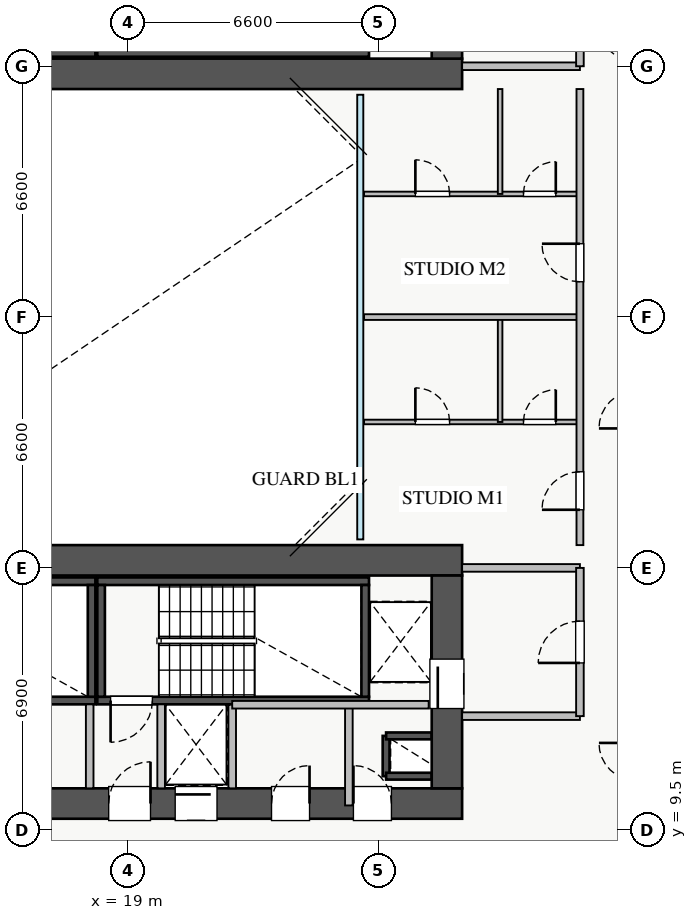
"""IFC4 building model, lengths in metres.
Left out: names, types, materials, properties, quantities, classifications, styles, units other than length and angle.
Written with IfcOpenShell. Run it as: python <this file> out.ifc"""

import sys

from ifc_helpers import new_model, si_unit, direction, frame, frame_2d, origin, place, context, subcontext, project, spatial, rectangle, extrude, source, transform, mapped, element, fill, save


model = new_model("IFC4")
c1 = context("Model", 3, precision=1e-05, world=origin(), true_north=direction((0.0, 1.0)))
c2 = subcontext(c1, "Body", "Model", "MODEL_VIEW")
j1 = project(units=[si_unit("LENGTHUNIT", "METRE"), si_unit("PLANEANGLEUNIT", "RADIAN")], contexts=[c1])
p1 = place(None, origin())
s1 = spatial("IfcSite", under=j1, at=p1, CompositionType="ELEMENT")
p2 = place(p1, origin())
s2 = spatial("IfcBuilding", under=s1, at=p2, CompositionType="ELEMENT")
p3 = place(p2, frame((0.0, 0.0, 50.25)))
s3 = spatial("IfcBuildingStorey", under=s2, at=p3, CompositionType="ELEMENT", Elevation=50.25)
p4 = place(p3, frame((25.8, 10.92, 0.0), z_axis=(0.0, 0.0, 1.0), x_axis=(0.0, 1.0, 0.0)))
e1 = element("IfcWall", 1, at=p4, inside=s3, PredefinedType="SHEAR", context=c2, shape_type="SweptSolid", body=[
    extrude(rectangle(XDim=1.06, YDim=0.18, at=frame_2d((0.53, 0.0))), origin(), (0.0, 0.0, 1.0), 3.07),
])
for number, where, z_axis, x_axis in (
    (2, (25.8, 11.98, 0.0), (0.0, 0.0, 1.0), (1.0, 0.0, 0.0)),
    (3, (25.8, 10.92, 0.0), (0.0, 0.0, 1.0), (1.0, 0.0, 0.0)),
):
    element("IfcWall", number, at=place(p3, frame(where, z_axis=z_axis, x_axis=x_axis)), inside=s3, PredefinedType="SHEAR", context=c2, shape_type="SweptSolid", body=[
        extrude(rectangle(XDim=1.2, YDim=0.18, at=frame_2d((0.6, 0.0))), origin(), (0.0, 0.0, 1.0), 3.07),
    ])
p5 = place(p3, frame((19.88, 12.8, 0.0), z_axis=(0.0, 0.0, 1.0), x_axis=(1.0, 0.0, 0.0)))
e4 = element("IfcWall", 4, at=p5, inside=s3, PredefinedType="SHEAR", context=c2, shape_type="SweptSolid", body=[
    extrude(rectangle(XDim=1.87, YDim=0.18, at=frame_2d((0.935, 0.0))), origin(), (0.0, 0.0, 1.0), 3.07),
])
p6 = place(p3, frame((11.0, 29.95, 0.0), z_axis=(0.0, 0.0, 1.0), x_axis=(1.0, 0.0, 0.0)))
e5 = element("IfcWall", 5, at=p6, inside=s3, PredefinedType="SHEAR", context=c2, shape_type="SweptSolid", body=[
    extrude(rectangle(XDim=7.15, YDim=0.2, at=frame_2d((3.575, 0.0))), origin(), (0.0, 0.0, 1.0), 3.25),
])
p7 = place(p3, frame((18.2, 29.95, 0.0), z_axis=(0.0, 0.0, 1.0), x_axis=(1.0, 0.0, 0.0)))
e6 = element("IfcWall", 6, at=p7, inside=s3, PredefinedType="SHEAR", context=c2, shape_type="SweptSolid", body=[
    extrude(rectangle(XDim=7.15, YDim=0.2, at=frame_2d((3.575, 0.0))), origin(), (0.0, 0.0, 1.0), 3.25),
])
p8 = place(p3, frame((11.0, 12.91, 0.0), z_axis=(0.0, 0.0, 1.0), x_axis=(1.0, 0.0, 0.0)))
e7 = element("IfcWall", 7, at=p8, inside=s3, PredefinedType="SHEAR", context=c2, shape_type="SweptSolid", body=[
    extrude(rectangle(XDim=7.15, YDim=0.2, at=frame_2d((3.575, 0.0))), origin(), (0.0, 0.0, 1.0), 3.25),
])
p9 = place(p8, frame((0.35, 0.0, 0.0)))
e8 = element("IfcOpeningElement", 8, at=p9, cuts=e7, PredefinedType="OPENING", context=c2, shape_type="SweptSolid", body=[
    extrude(rectangle(XDim=1.1, YDim=2.05, at=frame_2d((0.55, 1.025))), frame((0.0, 0.11, 0.0), z_axis=(0.0, -1.0, 0.0), x_axis=(1.0, 0.0, 0.0)), (0.0, 0.0, 1.0), 0.22),
])
p10 = place(p3, frame((11.0, 16.05, 0.0), z_axis=(0.0, 0.0, 1.0), x_axis=(1.0, 0.0, 0.0)))
e9 = element("IfcWall", 9, at=p10, inside=s3, PredefinedType="SHEAR", context=c2, shape_type="SweptSolid", body=[
    extrude(rectangle(XDim=7.15, YDim=0.2, at=frame_2d((3.575, 0.0))), origin(), (0.0, 0.0, 1.0), 3.25),
])
p11 = place(p3, frame((18.05, 13.01, 0.0), z_axis=(0.0, 0.0, 1.0), x_axis=(0.0, 1.0, 0.0)))
e10 = element("IfcWall", 10, at=p11, inside=s3, PredefinedType="SHEAR", context=c2, shape_type="SweptSolid", body=[
    extrude(rectangle(XDim=2.94, YDim=0.2, at=frame_2d((1.47, 0.0))), origin(), (0.0, 0.0, 1.0), 3.25),
])
p12 = place(p3, frame((18.2, 12.91, 0.0), z_axis=(0.0, 0.0, 1.0), x_axis=(1.0, 0.0, 0.0)))
e11 = element("IfcWall", 11, at=p12, inside=s3, PredefinedType="SHEAR", context=c2, shape_type="SweptSolid", body=[
    extrude(rectangle(XDim=7.15, YDim=0.2, at=frame_2d((3.575, 0.0))), origin(), (0.0, 0.0, 1.0), 3.25),
])
p13 = place(p12, frame((0.35, 0.0, 0.0)))
e12 = element("IfcOpeningElement", 12, at=p13, cuts=e11, PredefinedType="OPENING", context=c2, shape_type="SweptSolid", body=[
    extrude(rectangle(XDim=1.1, YDim=2.05, at=frame_2d((0.55, 1.025))), frame((0.0, 0.11, 0.0), z_axis=(0.0, -1.0, 0.0), x_axis=(1.0, 0.0, 0.0)), (0.0, 0.0, 1.0), 0.22),
])
p14 = place(p3, frame((18.2, 16.05, 0.0), z_axis=(0.0, 0.0, 1.0), x_axis=(1.0, 0.0, 0.0)))
e13 = element("IfcWall", 13, at=p14, inside=s3, PredefinedType="SHEAR", context=c2, shape_type="SweptSolid", body=[
    extrude(rectangle(XDim=7.15, YDim=0.2, at=frame_2d((3.575, 0.0))), origin(), (0.0, 0.0, 1.0), 3.25),
])
for number, where, z_axis, x_axis in (
    (14, (18.3, 13.01, 0.0), (0.0, 0.0, 1.0), (0.0, 1.0, 0.0)),
    (15, (25.25, 13.01, 0.0), (0.0, 0.0, 1.0), (0.0, 1.0, 0.0)),
):
    element("IfcWall", number, at=place(p3, frame(where, z_axis=z_axis, x_axis=x_axis)), inside=s3, PredefinedType="SHEAR", context=c2, shape_type="SweptSolid", body=[
        extrude(rectangle(XDim=2.94, YDim=0.2, at=frame_2d((1.47, 0.0))), origin(), (0.0, 0.0, 1.0), 3.25),
    ])
p15 = place(p3, frame((10.2, 29.4, 0.0), z_axis=(0.0, 0.0, 1.0), x_axis=(1.0, 0.0, 0.0)))
e16 = element("IfcWall", 16, at=p15, inside=s3, PredefinedType="SHEAR", context=c2, shape_type="SweptSolid", body=[
    extrude(rectangle(XDim=17.6, YDim=0.8, at=frame_2d((8.8, 0.0))), origin(), (0.0, 0.0, 1.0), 3.25),
])
p16 = place(p3, frame((27.4, 29.8, 0.0), z_axis=(0.0, 0.0, 1.0), x_axis=(0.0, 1.0, 0.0)))
e17 = element("IfcWall", 17, at=p16, inside=s3, PredefinedType="SHEAR", context=c2, shape_type="SweptSolid", body=[
    extrude(rectangle(XDim=5.6, YDim=0.8, at=frame_2d((2.8, 0.0))), origin(), (0.0, 0.0, 1.0), 3.25),
])
p17 = place(p16, frame((1.1, 0.0, 0.0)))
e18 = element("IfcOpeningElement", 18, at=p17, cuts=e17, PredefinedType="OPENING", context=c2, shape_type="SweptSolid", body=[
    extrude(rectangle(XDim=1.3, YDim=2.05, at=frame_2d((0.65, 1.025))), frame((0.0, 0.41, 0.0), z_axis=(0.0, -1.0, 0.0), x_axis=(1.0, 0.0, 0.0)), (0.0, 0.0, 1.0), 0.82),
])
p18 = place(p3, frame((10.2, 10.2, 0.0), z_axis=(0.0, 0.0, 1.0), x_axis=(1.0, 0.0, 0.0)))
e19 = element("IfcWall", 19, at=p18, inside=s3, PredefinedType="SHEAR", context=c2, shape_type="SweptSolid", body=[
    extrude(rectangle(XDim=17.6, YDim=0.8, at=frame_2d((8.8, 0.0))), origin(), (0.0, 0.0, 1.0), 3.25),
])
p19 = place(p18, frame((1.15, 0.0, 0.0)))
e20 = element("IfcOpeningElement", 20, at=p19, cuts=e19, PredefinedType="OPENING", context=c2, shape_type="SweptSolid", body=[
    extrude(rectangle(XDim=1.1, YDim=2.05, at=frame_2d((0.55, 1.025))), frame((0.0, 0.41, 0.0), z_axis=(0.0, -1.0, 0.0), x_axis=(1.0, 0.0, 0.0)), (0.0, 0.0, 1.0), 0.82),
])
p20 = place(p18, frame((8.3, 0.0, 0.0)))
e21 = element("IfcOpeningElement", 21, at=p20, cuts=e19, PredefinedType="OPENING", context=c2, shape_type="SweptSolid", body=[
    extrude(rectangle(XDim=1.1, YDim=2.05, at=frame_2d((0.55, 1.025))), frame((0.0, 0.41, 0.0), z_axis=(0.0, -1.0, 0.0), x_axis=(1.0, 0.0, 0.0)), (0.0, 0.0, 1.0), 0.82),
])
p21 = place(p18, frame((10.05, 0.0, 0.0)))
e22 = element("IfcOpeningElement", 22, at=p21, cuts=e19, PredefinedType="OPENING", context=c2, shape_type="SweptSolid", body=[
    extrude(rectangle(XDim=1.1, YDim=2.05, at=frame_2d((0.55, 1.025))), frame((0.0, 0.41, 0.0), z_axis=(0.0, -1.0, 0.0), x_axis=(1.0, 0.0, 0.0)), (0.0, 0.0, 1.0), 0.82),
])
p22 = place(p18, frame((14.74, 0.0, 0.0)))
e23 = element("IfcOpeningElement", 23, at=p22, cuts=e19, PredefinedType="OPENING", context=c2, shape_type="SweptSolid", body=[
    extrude(rectangle(XDim=1.0, YDim=2.05, at=frame_2d((0.5, 1.025))), frame((0.0, 0.41, 0.0), z_axis=(0.0, -1.0, 0.0), x_axis=(1.0, 0.0, 0.0)), (0.0, 0.0, 1.0), 0.82),
])
p23 = place(p18, frame((12.585, 0.0, 0.0)))
e24 = element("IfcOpeningElement", 24, at=p23, cuts=e19, PredefinedType="OPENING", context=c2, shape_type="SweptSolid", body=[
    extrude(rectangle(XDim=1.0, YDim=2.05, at=frame_2d((0.5, 1.025))), frame((0.0, 0.41, 0.0), z_axis=(0.0, -1.0, 0.0), x_axis=(1.0, 0.0, 0.0)), (0.0, 0.0, 1.0), 0.82),
])
p24 = place(p3, frame((10.2, 16.6, 0.0), z_axis=(0.0, 0.0, 1.0), x_axis=(1.0, 0.0, 0.0)))
e25 = element("IfcWall", 25, at=p24, inside=s3, PredefinedType="SHEAR", context=c2, shape_type="SweptSolid", body=[
    extrude(rectangle(XDim=17.6, YDim=0.8, at=frame_2d((8.8, 0.0))), origin(), (0.0, 0.0, 1.0), 3.25),
])
p25 = place(p3, frame((27.4, 10.6, 0.0), z_axis=(0.0, 0.0, 1.0), x_axis=(0.0, 1.0, 0.0)))
e26 = element("IfcWall", 26, at=p25, inside=s3, PredefinedType="SHEAR", context=c2, shape_type="SweptSolid", body=[
    extrude(rectangle(XDim=5.6, YDim=0.8, at=frame_2d((2.8, 0.0))), origin(), (0.0, 0.0, 1.0), 3.25),
])
p26 = place(p25, frame((2.1, 0.0, 0.0)))
e27 = element("IfcOpeningElement", 27, at=p26, cuts=e26, PredefinedType="OPENING", context=c2, shape_type="SweptSolid", body=[
    extrude(rectangle(XDim=1.3, YDim=2.05, at=frame_2d((0.65, 1.025))), frame((0.0, 0.41, 0.0), z_axis=(0.0, -1.0, 0.0), x_axis=(1.0, 0.0, 0.0)), (0.0, 0.0, 1.0), 0.82),
])
p27 = place(p3, frame((27.8, 29.6, 0.0), z_axis=(0.0, 0.0, 1.0), x_axis=(1.0, 0.0, 0.0)))
e28 = element("IfcWall", 28, at=p27, inside=s3, PredefinedType="PARTITIONING", context=c2, shape_type="SweptSolid", body=[
    extrude(rectangle(XDim=3.1, YDim=0.2, at=frame_2d((1.55, 0.0))), origin(), (0.0, 0.0, 1.0), 3.07),
])
p28 = place(p3, frame((30.9, 29.6, 0.0), z_axis=(0.0, 0.0, 1.0), x_axis=(0.0, 1.0, 0.0)))
e29 = element("IfcWall", 29, at=p28, inside=s3, PredefinedType="PARTITIONING", context=c2, shape_type="SweptSolid", body=[
    extrude(rectangle(XDim=3.9, YDim=0.2, at=frame_2d((1.95, 0.0))), origin(), (0.0, 0.0, 1.0), 3.07),
])
p29 = place(p28, frame((1.4, 0.0, 0.0)))
e30 = element("IfcOpeningElement", 30, at=p29, cuts=e29, PredefinedType="OPENING", context=c2, shape_type="SweptSolid", body=[
    extrude(rectangle(XDim=1.1, YDim=2.05, at=frame_2d((0.55, 1.025))), frame((0.0, 0.11, 0.0), z_axis=(0.0, -1.0, 0.0), x_axis=(1.0, 0.0, 0.0)), (0.0, 0.0, 1.0), 0.22),
])
for number, where, z_axis, x_axis in (
    (31, (27.8, 16.4, 0.0), (0.0, 0.0, 1.0), (1.0, 0.0, 0.0)),
    (32, (27.8, 12.5, 0.0), (0.0, 0.0, 1.0), (1.0, 0.0, 0.0)),
):
    element("IfcWall", number, at=place(p3, frame(where, z_axis=z_axis, x_axis=x_axis)), inside=s3, PredefinedType="PARTITIONING", context=c2, shape_type="SweptSolid", body=[
        extrude(rectangle(XDim=3.1, YDim=0.2, at=frame_2d((1.55, 0.0))), origin(), (0.0, 0.0, 1.0), 3.07),
    ])
p30 = place(p3, frame((30.9, 12.5, 0.0), z_axis=(0.0, 0.0, 1.0), x_axis=(0.0, 1.0, 0.0)))
e33 = element("IfcWall", 33, at=p30, inside=s3, PredefinedType="PARTITIONING", context=c2, shape_type="SweptSolid", body=[
    extrude(rectangle(XDim=3.9, YDim=0.2, at=frame_2d((1.95, 0.0))), origin(), (0.0, 0.0, 1.0), 3.07),
])
p31 = place(p30, frame((1.4, 0.0, 0.0)))
e34 = element("IfcOpeningElement", 34, at=p31, cuts=e33, PredefinedType="OPENING", context=c2, shape_type="SweptSolid", body=[
    extrude(rectangle(XDim=1.1, YDim=2.05, at=frame_2d((0.55, 1.025))), frame((0.0, 0.11, 0.0), z_axis=(0.0, -1.0, 0.0), x_axis=(1.0, 0.0, 0.0)), (0.0, 0.0, 1.0), 0.22),
])
for number, where, z_axis, x_axis in (
    (35, (18.0, 10.6, 0.0), (0.0, 0.0, 1.0), (0.0, 1.0, 0.0)),
    (36, (19.88, 10.6, 0.0), (0.0, 0.0, 1.0), (0.0, 1.0, 0.0)),
):
    element("IfcWall", number, at=place(p3, frame(where, z_axis=z_axis, x_axis=x_axis)), inside=s3, PredefinedType="PARTITIONING", context=c2, shape_type="SweptSolid", body=[
        extrude(rectangle(XDim=2.21, YDim=0.2, at=frame_2d((1.105, 0.0))), origin(), (0.0, 0.0, 1.0), 3.07),
    ])
p32 = place(p3, frame((24.82, 10.15, 0.0), z_axis=(0.0, 0.0, 1.0), x_axis=(0.0, 1.0, 0.0)))
e37 = element("IfcWall", 37, at=p32, inside=s3, PredefinedType="PARTITIONING", context=c2, shape_type="SweptSolid", body=[
    extrude(rectangle(XDim=2.65, YDim=0.2, at=frame_2d((1.325, 0.0))), origin(), (0.0, 0.0, 1.0), 3.07),
])
p33 = place(p3, frame((21.75, 10.6, 0.0), z_axis=(0.0, 0.0, 1.0), x_axis=(0.0, 1.0, 0.0)))
e38 = element("IfcWall", 38, at=p33, inside=s3, PredefinedType="PARTITIONING", context=c2, shape_type="SweptSolid", body=[
    extrude(rectangle(XDim=2.2, YDim=0.2, at=frame_2d((1.1, 0.0))), origin(), (0.0, 0.0, 1.0), 3.07),
])
p34 = place(p3, frame((21.75, 12.8, 0.0), z_axis=(0.0, 0.0, 1.0), x_axis=(1.0, 0.0, 0.0)))
e39 = element("IfcWall", 39, at=p34, inside=s3, PredefinedType="PARTITIONING", context=c2, shape_type="SweptSolid", body=[
    extrude(rectangle(XDim=5.17, YDim=0.2, at=frame_2d((2.585, 0.0))), origin(), (0.0, 0.0, 1.0), 3.07),
])
p35 = place(p3, frame((25.22, 20.24, 0.0), z_axis=(0.0, 0.0, 1.0), x_axis=(1.0, 0.0, 0.0)))
e40 = element("IfcWall", 40, at=p35, inside=s3, PredefinedType="PLUMBINGWALL", context=c2, shape_type="SweptSolid", body=[
    extrude(rectangle(XDim=5.68, YDim=0.12, at=frame_2d((2.84, 0.0))), origin(), (0.0, 0.0, 1.0), 2.625),
])
p36 = place(p35, frame((1.35, 0.0, 0.0)))
e41 = element("IfcOpeningElement", 41, at=p36, cuts=e40, PredefinedType="OPENING", context=c2, shape_type="SweptSolid", body=[
    extrude(rectangle(XDim=0.9, YDim=2.05, at=frame_2d((0.45, 1.025))), frame((0.0, 0.07, 0.0), z_axis=(0.0, -1.0, 0.0), x_axis=(1.0, 0.0, 0.0)), (0.0, 0.0, 1.0), 0.14),
])
p37 = place(p35, frame((4.195, 0.0, 0.0)))
e42 = element("IfcOpeningElement", 42, at=p37, cuts=e40, PredefinedType="OPENING", context=c2, shape_type="SweptSolid", body=[
    extrude(rectangle(XDim=0.85, YDim=2.05, at=frame_2d((0.425, 1.025))), frame((0.0, 0.07, 0.0), z_axis=(0.0, -1.0, 0.0), x_axis=(1.0, 0.0, 0.0)), (0.0, 0.0, 1.0), 0.14),
])
p38 = place(p3, frame((28.8, 20.24, 0.0), z_axis=(0.0, 0.0, 1.0), x_axis=(0.0, 1.0, 0.0)))
e43 = element("IfcWall", 43, at=p38, inside=s3, PredefinedType="PLUMBINGWALL", context=c2, shape_type="SweptSolid", body=[
    extrude(rectangle(XDim=2.76, YDim=0.12, at=frame_2d((1.38, 0.0))), origin(), (0.0, 0.0, 1.0), 3.07),
])
p39 = place(p3, frame((25.22, 26.24, 0.0), z_axis=(0.0, 0.0, 1.0), x_axis=(1.0, 0.0, 0.0)))
e44 = element("IfcWall", 44, at=p39, inside=s3, PredefinedType="PLUMBINGWALL", context=c2, shape_type="SweptSolid", body=[
    extrude(rectangle(XDim=5.68, YDim=0.12, at=frame_2d((2.84, 0.0))), origin(), (0.0, 0.0, 1.0), 2.625),
])
p40 = place(p39, frame((1.35, 0.0, 0.0)))
e45 = element("IfcOpeningElement", 45, at=p40, cuts=e44, PredefinedType="OPENING", context=c2, shape_type="SweptSolid", body=[
    extrude(rectangle(XDim=0.9, YDim=2.05, at=frame_2d((0.45, 1.025))), frame((0.0, 0.07, 0.0), z_axis=(0.0, -1.0, 0.0), x_axis=(1.0, 0.0, 0.0)), (0.0, 0.0, 1.0), 0.14),
])
p41 = place(p39, frame((4.195, 0.0, 0.0)))
e46 = element("IfcOpeningElement", 46, at=p41, cuts=e44, PredefinedType="OPENING", context=c2, shape_type="SweptSolid", body=[
    extrude(rectangle(XDim=0.85, YDim=2.05, at=frame_2d((0.425, 1.025))), frame((0.0, 0.07, 0.0), z_axis=(0.0, -1.0, 0.0), x_axis=(1.0, 0.0, 0.0)), (0.0, 0.0, 1.0), 0.14),
])
p42 = place(p3, frame((28.8, 26.24, 0.0), z_axis=(0.0, 0.0, 1.0), x_axis=(0.0, 1.0, 0.0)))
e47 = element("IfcWall", 47, at=p42, inside=s3, PredefinedType="PLUMBINGWALL", context=c2, shape_type="SweptSolid", body=[
    extrude(rectangle(XDim=2.76, YDim=0.12, at=frame_2d((1.38, 0.0))), origin(), (0.0, 0.0, 1.0), 3.07),
])
p43 = place(p3, frame((25.22, 23.0, 0.0), z_axis=(0.0, 0.0, 1.0), x_axis=(1.0, 0.0, 0.0)))
e48 = element("IfcWall", 48, at=p43, inside=s3, PredefinedType="PARTITIONING", context=c2, shape_type="SweptSolid", body=[
    extrude(rectangle(XDim=5.68, YDim=0.15, at=frame_2d((2.84, 0.0))), origin(), (0.0, 0.0, 1.0), 3.07),
])
p44 = place(p3, frame((30.9, 17.0, 0.0), z_axis=(0.0, 0.0, 1.0), x_axis=(0.0, 1.0, 0.0)))
e49 = element("IfcWall", 49, at=p44, inside=s3, PredefinedType="PARTITIONING", context=c2, shape_type="SweptSolid", body=[
    extrude(rectangle(XDim=12.0, YDim=0.18, at=frame_2d((6.0, 0.0))), origin(), (0.0, 0.0, 1.0), 3.07),
])
p45 = place(p44, frame((0.93, 0.0, 0.0)))
e50 = element("IfcOpeningElement", 50, at=p45, cuts=e49, PredefinedType="OPENING", context=c2, shape_type="SweptSolid", body=[
    extrude(rectangle(XDim=1.0, YDim=2.05, at=frame_2d((0.5, 1.025))), frame((0.0, 0.1, 0.0), z_axis=(0.0, -1.0, 0.0), x_axis=(1.0, 0.0, 0.0)), (0.0, 0.0, 1.0), 0.2),
])
p46 = place(p44, frame((6.93, 0.0, 0.0)))
e51 = element("IfcOpeningElement", 51, at=p46, cuts=e49, PredefinedType="OPENING", context=c2, shape_type="SweptSolid", body=[
    extrude(rectangle(XDim=1.0, YDim=2.05, at=frame_2d((0.5, 1.025))), frame((0.0, 0.1, 0.0), z_axis=(0.0, -1.0, 0.0), x_axis=(1.0, 0.0, 0.0)), (0.0, 0.0, 1.0), 0.2),
])
m1 = source(origin(), c2, "Body", "SweptSolid", [
    extrude(rectangle(XDim=1.3, YDim=2.05, at=frame_2d((0.65, 1.025))), frame((0.0, 0.025, 0.0), z_axis=(0.0, -1.0, 0.0), x_axis=(1.0, 0.0, 0.0)), (0.0, 0.0, 1.0), 0.05),
])
p47 = place(p26, origin())
e52 = element("IfcDoor", 52, at=p47, inside=s3, OperationType="SLIDING_TO_RIGHT", PredefinedType="DOOR", context=c2, shape_type="MappedRepresentation", body=[
    mapped(m1, transform((0.0, 0.0, 0.0), x_axis=(1.0, 0.0, 0.0), y_axis=(0.0, 1.0, 0.0), z_axis=(0.0, 0.0, 1.0), scale=1.0)),
])
fill(e27, e52)
m2 = source(origin(), c2, "Body", "SweptSolid", [
    extrude(rectangle(XDim=1.1, YDim=2.05, at=frame_2d((0.55, 1.025))), frame((0.0, 0.025, 0.0), z_axis=(0.0, -1.0, 0.0), x_axis=(1.0, 0.0, 0.0)), (0.0, 0.0, 1.0), 0.05),
])
p48 = place(p20, origin())
e53 = element("IfcDoor", 53, at=p48, inside=s3, OperationType="SINGLE_SWING_RIGHT", PredefinedType="DOOR", context=c2, shape_type="MappedRepresentation", body=[
    mapped(m2, transform((0.0, 0.0, 0.0), x_axis=(1.0, 0.0, 0.0), y_axis=(0.0, 1.0, 0.0), z_axis=(0.0, 0.0, 1.0), scale=1.0)),
])
fill(e21, e53)
p49 = place(p13, frame((1.1, 0.0, 0.0), z_axis=(0.0, 0.0, 1.0), x_axis=(-1.0, 0.0, 0.0)))
e54 = element("IfcDoor", 54, at=p49, inside=s3, OperationType="SINGLE_SWING_LEFT", PredefinedType="DOOR", context=c2, shape_type="MappedRepresentation", body=[
    mapped(m2, transform((0.0, 0.0, 0.0), x_axis=(1.0, 0.0, 0.0), y_axis=(0.0, 1.0, 0.0), z_axis=(0.0, 0.0, 1.0), scale=1.0)),
])
fill(e12, e54)
p50 = place(p21, origin())
e55 = element("IfcDoor", 55, at=p50, inside=s3, OperationType="SLIDING_TO_RIGHT", PredefinedType="DOOR", context=c2, shape_type="MappedRepresentation", body=[
    mapped(m2, transform((0.0, 0.0, 0.0), x_axis=(1.0, 0.0, 0.0), y_axis=(0.0, 1.0, 0.0), z_axis=(0.0, 0.0, 1.0), scale=1.0)),
])
fill(e22, e55)
m3 = source(origin(), c2, "Body", "SweptSolid", [
    extrude(rectangle(XDim=1.0, YDim=2.05, at=frame_2d((0.5, 1.025))), frame((0.0, 0.025, 0.0), z_axis=(0.0, -1.0, 0.0), x_axis=(1.0, 0.0, 0.0)), (0.0, 0.0, 1.0), 0.05),
])
p51 = place(p22, origin())
e56 = element("IfcDoor", 56, at=p51, inside=s3, OperationType="SINGLE_SWING_LEFT", PredefinedType="DOOR", context=c2, shape_type="MappedRepresentation", body=[
    mapped(m3, transform((0.0, 0.0, 0.0), x_axis=(1.0, 0.0, 0.0), y_axis=(0.0, 1.0, 0.0), z_axis=(0.0, 0.0, 1.0), scale=1.0)),
])
fill(e23, e56)
p52 = place(p23, origin())
e57 = element("IfcDoor", 57, at=p52, inside=s3, OperationType="SINGLE_SWING_RIGHT", PredefinedType="DOOR", context=c2, shape_type="MappedRepresentation", body=[
    mapped(m3, transform((0.0, 0.0, 0.0), x_axis=(1.0, 0.0, 0.0), y_axis=(0.0, 1.0, 0.0), z_axis=(0.0, 0.0, 1.0), scale=1.0)),
])
fill(e24, e57)
p53 = place(p31, origin())
e58 = element("IfcDoor", 58, at=p53, inside=s3, OperationType="SINGLE_SWING_LEFT", PredefinedType="DOOR", context=c2, shape_type="MappedRepresentation", body=[
    mapped(m2, transform((0.0, 0.0, 0.0), x_axis=(1.0, 0.0, 0.0), y_axis=(0.0, 1.0, 0.0), z_axis=(0.0, 0.0, 1.0), scale=1.0)),
])
fill(e34, e58)
m4 = source(origin(), c2, "Body", "SweptSolid", [
    extrude(rectangle(XDim=0.9, YDim=2.05, at=frame_2d((0.45, 1.025))), frame((0.0, 0.025, 0.0), z_axis=(0.0, -1.0, 0.0), x_axis=(1.0, 0.0, 0.0)), (0.0, 0.0, 1.0), 0.05),
])
p54 = place(p36, origin())
e59 = element("IfcDoor", 59, at=p54, inside=s3, OperationType="SINGLE_SWING_LEFT", PredefinedType="DOOR", context=c2, shape_type="MappedRepresentation", body=[
    mapped(m4, transform((0.0, 0.0, 0.0), x_axis=(1.0, 0.0, 0.0), y_axis=(0.0, 1.0, 0.0), z_axis=(0.0, 0.0, 1.0), scale=1.0)),
])
fill(e41, e59)
m5 = source(origin(), c2, "Body", "SweptSolid", [
    extrude(rectangle(XDim=0.85, YDim=2.05, at=frame_2d((0.425, 1.025))), frame((0.0, 0.025, 0.0), z_axis=(0.0, -1.0, 0.0), x_axis=(1.0, 0.0, 0.0)), (0.0, 0.0, 1.0), 0.05),
])
p55 = place(p37, origin())
e60 = element("IfcDoor", 60, at=p55, inside=s3, OperationType="SINGLE_SWING_RIGHT", PredefinedType="DOOR", context=c2, shape_type="MappedRepresentation", body=[
    mapped(m5, transform((0.0, 0.0, 0.0), x_axis=(1.0, 0.0, 0.0), y_axis=(0.0, 1.0, 0.0), z_axis=(0.0, 0.0, 1.0), scale=1.0)),
])
fill(e42, e60)
p56 = place(p40, origin())
e61 = element("IfcDoor", 61, at=p56, inside=s3, OperationType="SINGLE_SWING_LEFT", PredefinedType="DOOR", context=c2, shape_type="MappedRepresentation", body=[
    mapped(m4, transform((0.0, 0.0, 0.0), x_axis=(1.0, 0.0, 0.0), y_axis=(0.0, 1.0, 0.0), z_axis=(0.0, 0.0, 1.0), scale=1.0)),
])
fill(e45, e61)
p57 = place(p41, origin())
e62 = element("IfcDoor", 62, at=p57, inside=s3, OperationType="SINGLE_SWING_RIGHT", PredefinedType="DOOR", context=c2, shape_type="MappedRepresentation", body=[
    mapped(m5, transform((0.0, 0.0, 0.0), x_axis=(1.0, 0.0, 0.0), y_axis=(0.0, 1.0, 0.0), z_axis=(0.0, 0.0, 1.0), scale=1.0)),
])
fill(e46, e62)
p58 = place(p45, origin())
e63 = element("IfcDoor", 63, at=p58, inside=s3, OperationType="SINGLE_SWING_LEFT", PredefinedType="DOOR", context=c2, shape_type="MappedRepresentation", body=[
    mapped(m3, transform((0.0, 0.0, 0.0), x_axis=(1.0, 0.0, 0.0), y_axis=(0.0, 1.0, 0.0), z_axis=(0.0, 0.0, 1.0), scale=1.0)),
])
fill(e50, e63)
p59 = place(p46, origin())
e64 = element("IfcDoor", 64, at=p59, inside=s3, OperationType="SINGLE_SWING_RIGHT", PredefinedType="DOOR", context=c2, shape_type="MappedRepresentation", body=[
    mapped(m3, transform((0.0, 0.0, 0.0), x_axis=(1.0, 0.0, 0.0), y_axis=(0.0, 1.0, 0.0), z_axis=(0.0, 0.0, 1.0), scale=1.0)),
])
fill(e51, e64)
save(model, sys.argv[1])
